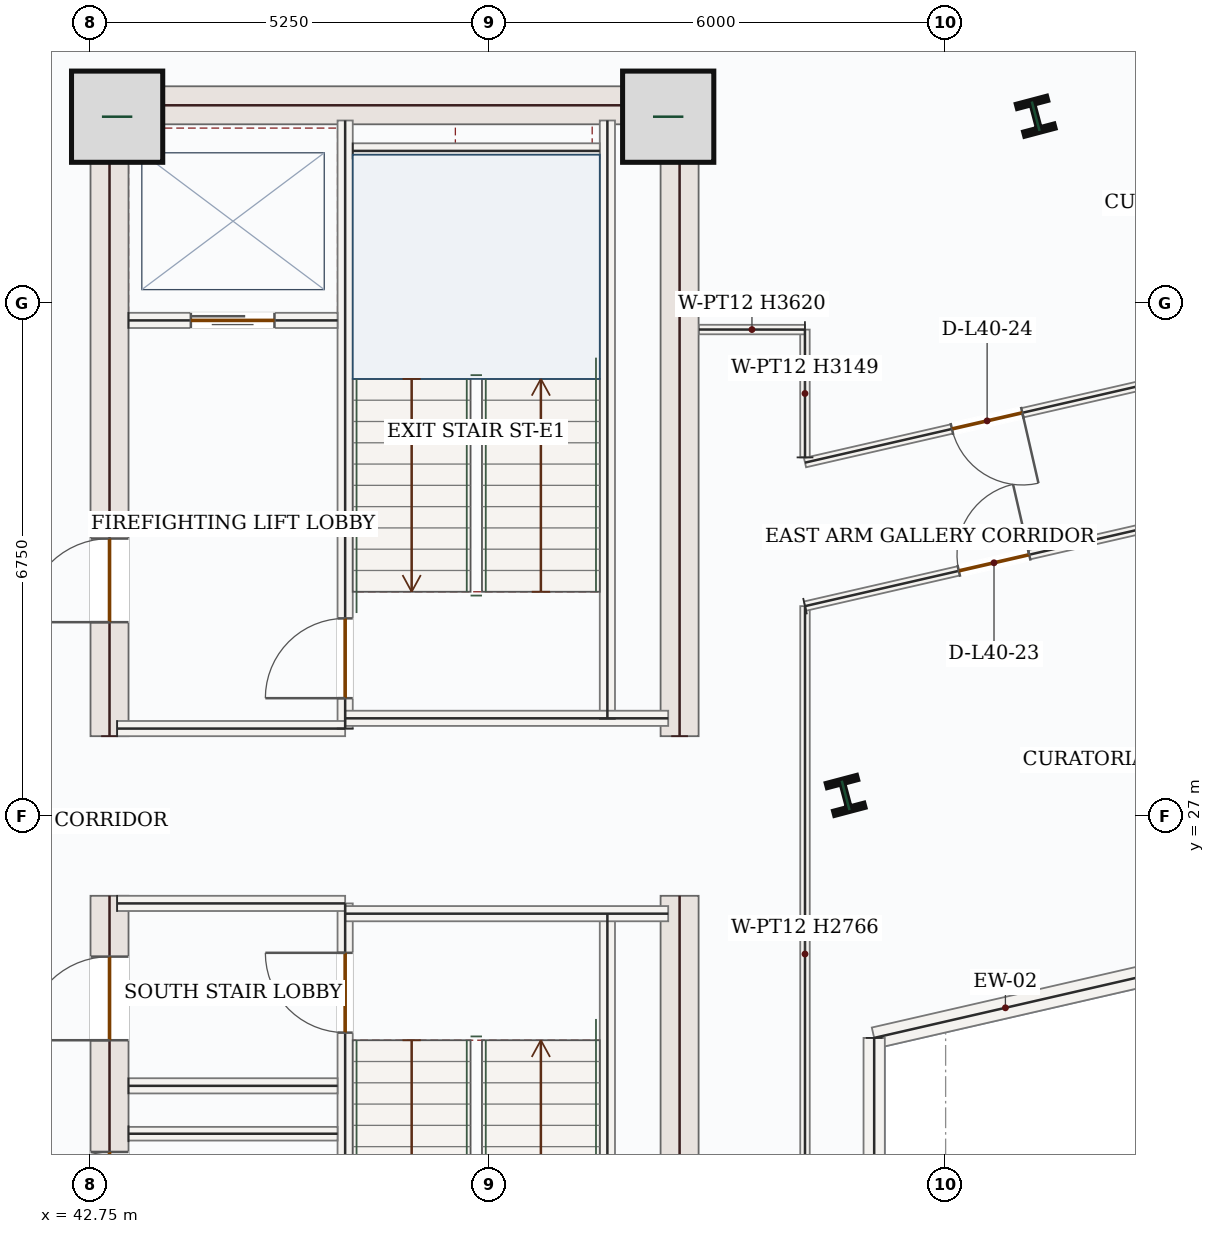
"""IFC4 building model, lengths in metres.
Left out: names, types, materials, properties, quantities, classifications, styles, units other than length and angle.
Written with IfcOpenShell. Run it as: python <this file> out.ifc"""

import sys

from ifc_helpers import new_model, si_unit, direction, frame, frame_2d, origin, origin_2d, place, context, subcontext, project, spatial, rectangle, i_section, extrude, source, transform, mapped, element, fill, save


model = new_model("IFC4")
c1 = context("Model", 3, precision=1e-05, world=origin(), true_north=direction((0.0, 1.0)))
c2 = subcontext(c1, "Body", "Model", "MODEL_VIEW")
j1 = project(units=[si_unit("LENGTHUNIT", "METRE"), si_unit("PLANEANGLEUNIT", "RADIAN")], contexts=[c1])
p1 = place(None, origin())
s1 = spatial("IfcSite", under=j1, at=p1, CompositionType="ELEMENT")
p2 = place(p1, origin())
s2 = spatial("IfcBuilding", under=s1, at=p2, CompositionType="ELEMENT")
p3 = place(p2, frame((0.0, 0.0, 174.6)))
s3 = spatial("IfcBuildingStorey", under=s2, at=p3, CompositionType="ELEMENT", Elevation=174.6)
p4 = place(p3, frame((43.0, 17.4, 0.0), z_axis=(0.0, 0.0, 1.0), x_axis=(0.0, 1.0, 0.0)))
e1 = element("IfcWall", 1, at=p4, inside=s3, PredefinedType="SHEAR", context=c2, shape_type="SweptSolid", body=[
    extrude(rectangle(XDim=8.55, YDim=0.5, at=frame_2d((4.275, 0.0))), origin(), (0.0, 0.0, 1.0), 3.62),
])
p5 = place(p4, frame((6.65, 0.0, 0.0)))
e2 = element("IfcOpeningElement", 2, at=p5, cuts=e1, PredefinedType="OPENING", context=c2, shape_type="SweptSolid", body=[
    extrude(rectangle(XDim=1.1, YDim=2.2, at=frame_2d((0.55, 1.1))), frame((0.0, 0.26, 0.0), z_axis=(0.0, -1.0, 0.0), x_axis=(1.0, 0.0, 0.0)), (0.0, 0.0, 1.0), 0.52),
])
p6 = place(p4, frame((1.75, 0.0, 0.0)))
e3 = element("IfcOpeningElement", 3, at=p6, cuts=e1, PredefinedType="OPENING", context=c2, shape_type="SweptSolid", body=[
    extrude(rectangle(XDim=1.3, YDim=2.2, at=frame_2d((0.65, 1.1))), frame((0.0, 0.26, 0.0), z_axis=(0.0, -1.0, 0.0), x_axis=(1.0, 0.0, 0.0)), (0.0, 0.0, 1.0), 0.52),
])
p7 = place(p4, frame((4.3, 0.0, 0.0)))
e4 = element("IfcOpeningElement", 4, at=p7, cuts=e1, PredefinedType="OPENING", context=c2, shape_type="SweptSolid", body=[
    extrude(rectangle(XDim=0.88, YDim=2.1, at=frame_2d((0.44, 1.05))), frame((0.0, 0.26, 0.0), z_axis=(0.0, -1.0, 0.0), x_axis=(1.0, 0.0, 0.0)), (0.0, 0.0, 1.0), 0.52),
])
p8 = place(p3, frame((43.0, 28.05, 0.0), z_axis=(0.0, 0.0, 1.0), x_axis=(0.0, 1.0, 0.0)))
e5 = element("IfcWall", 5, at=p8, inside=s3, PredefinedType="SHEAR", context=c2, shape_type="SweptSolid", body=[
    extrude(rectangle(XDim=8.55, YDim=0.5, at=frame_2d((4.275, 0.0))), origin(), (0.0, 0.0, 1.0), 3.62),
])
p9 = place(p8, frame((1.5, 0.0, 0.0)))
e6 = element("IfcOpeningElement", 6, at=p9, cuts=e5, PredefinedType="OPENING", context=c2, shape_type="SweptSolid", body=[
    extrude(rectangle(XDim=1.1, YDim=2.2, at=frame_2d((0.55, 1.1))), frame((0.0, 0.26, 0.0), z_axis=(0.0, -1.0, 0.0), x_axis=(1.0, 0.0, 0.0)), (0.0, 0.0, 1.0), 0.52),
])
m1 = source(origin(), c2, "Body", "SweptSolid", [
    extrude(rectangle(XDim=8.55, YDim=0.5, at=frame_2d((4.275, 0.0))), origin(), (0.0, 0.0, 1.0), 3.62),
])
for number, where, z_axis, x_axis in (
    (7, (50.5, 17.4, 0.0), (0.0, 0.0, 1.0), (0.0, 1.0, 0.0)),
    (8, (50.5, 28.05, 0.0), (0.0, 0.0, 1.0), (0.0, 1.0, 0.0)),
):
    element("IfcWall", number, at=place(p3, frame(where, z_axis=z_axis, x_axis=x_axis)), inside=s3, PredefinedType="SHEAR", context=c2, shape_type="MappedRepresentation", body=[
        mapped(m1, transform((0.0, 0.0, 0.0), x_axis=(1.0, 0.0, 0.0), y_axis=(0.0, 1.0, 0.0), z_axis=(0.0, 0.0, 1.0), scale=1.0)),
    ])
m2 = source(origin(), c2, "Body", "SweptSolid", [
    extrude(rectangle(XDim=7.0, YDim=0.5, at=frame_2d((3.5, 0.0))), origin(), (0.0, 0.0, 1.0), 3.62),
])
p10 = place(p3, frame((43.25, 36.35, 0.0), z_axis=(0.0, 0.0, 1.0), x_axis=(1.0, 0.0, 0.0)))
e9 = element("IfcWall", 9, at=p10, inside=s3, PredefinedType="SHEAR", context=c2, shape_type="MappedRepresentation", body=[
    mapped(m2, transform((0.0, 0.0, 0.0), x_axis=(1.0, 0.0, 0.0), y_axis=(0.0, 1.0, 0.0), z_axis=(0.0, 0.0, 1.0), scale=1.0)),
])
m3 = source(origin(), c2, "Body", "SweptSolid", [
    extrude(rectangle(XDim=1.2, YDim=1.2, at=origin_2d()), origin(), (0.0, 0.0, 1.0), 3.9),
])
for number, where, z_axis, x_axis in (
    (10, (43.1, 36.2, 0.0), (0.0, 0.0, 1.0), (1.0, 0.0, 0.0)),
    (11, (50.35, 36.2, 0.0), (0.0, 0.0, 1.0), (1.0, 0.0, 0.0)),
):
    element("IfcColumn", number, at=place(p3, frame(where, z_axis=z_axis, x_axis=x_axis)), inside=s3, PredefinedType="COLUMN", context=c2, shape_type="MappedRepresentation", body=[
        mapped(m3, transform((0.0, 0.0, 0.0), x_axis=(1.0, 0.0, 0.0), y_axis=(0.0, 1.0, 0.0), z_axis=(0.0, 0.0, 1.0), scale=1.0)),
    ])
m4 = source(origin(), c2, "Body", "SweptSolid", [
    extrude(i_section(OverallWidth=0.412, OverallDepth=0.435, WebThickness=0.036, FlangeThickness=0.057, FilletRadius=0.018, at=origin_2d()), origin(), (0.0, 0.0, 1.0), 3.9),
])
for number, where, z_axis, x_axis in (
    (12, (52.684, 27.271, 0.0), (0.0, 0.0, 1.0), (0.967, 0.255, 0.0)),
    (13, (55.185, 36.206, 0.0), (0.0, 0.0, 1.0), (0.967, 0.255, 0.0)),
):
    element("IfcColumn", number, at=place(p3, frame(where, z_axis=z_axis, x_axis=x_axis)), inside=s3, PredefinedType="COLUMN", context=c2, shape_type="MappedRepresentation", body=[
        mapped(m4, transform((0.0, 0.0, 0.0), x_axis=(1.0, 0.0, 0.0), y_axis=(0.0, 1.0, 0.0), z_axis=(0.0, 0.0, 1.0), scale=1.0)),
    ])
p11 = place(p3, frame((62.012, 26.134, 0.0), z_axis=(0.0, 0.0, 1.0), x_axis=(-0.974680686557, -0.223601340005, 0.0)))
e14 = element("IfcWall", 14, at=p11, inside=s3, PredefinedType="SOLIDWALL", context=c2, shape_type="SweptSolid", body=[
    extrude(rectangle(XDim=9.185, YDim=0.28, at=frame_2d((4.592, 0.0))), origin(), (0.0, 0.0, 1.0), 3.62),
])
p12 = place(p11, frame((3.692, 0.0, 0.85)))
e15 = element("IfcOpeningElement", 15, at=p12, cuts=e14, PredefinedType="OPENING", context=c2, shape_type="SweptSolid", body=[
    extrude(rectangle(XDim=1.8, YDim=1.75, at=frame_2d((0.9, 0.875))), frame((0.0, 0.15, 0.0), z_axis=(0.0, -1.0, 0.0), x_axis=(1.0, 0.0, 0.0)), (0.0, 0.0, 1.0), 0.3),
])
p13 = place(p3, frame((53.06, 24.081, 0.0), z_axis=(0.0, 0.0, 1.0), x_axis=(0.0, -1.0, 0.0)))
e16 = element("IfcWall", 16, at=p13, inside=s3, PredefinedType="SOLIDWALL", context=c2, shape_type="SweptSolid", body=[
    extrude(rectangle(XDim=5.623, YDim=0.28, at=frame_2d((2.811, 0.0))), origin(), (0.0, 0.0, 1.0), 3.62),
])
p14 = place(p13, frame((1.911, 0.0, 0.85)))
e17 = element("IfcOpeningElement", 17, at=p14, cuts=e16, PredefinedType="OPENING", context=c2, shape_type="SweptSolid", body=[
    extrude(rectangle(XDim=1.8, YDim=1.75, at=frame_2d((0.9, 0.875))), frame((0.0, 0.15, 0.0), z_axis=(0.0, -1.0, 0.0), x_axis=(1.0, 0.0, 0.0)), (0.0, 0.0, 1.0), 0.3),
])
m5 = source(origin(), c2, "Body", "SweptSolid", [
    extrude(rectangle(XDim=7.87, YDim=0.2, at=frame_2d((3.935, 0.0))), origin(), (0.0, 0.0, 1.0), 3.62),
])
for number, where, z_axis, x_axis in (
    (18, (49.55, 17.85, 0.0), (0.0, 0.0, 1.0), (0.0, 1.0, 0.0)),
    (19, (49.55, 28.28, 0.0), (0.0, 0.0, 1.0), (0.0, 1.0, 0.0)),
):
    element("IfcWall", number, at=place(p3, frame(where, z_axis=z_axis, x_axis=x_axis)), inside=s3, PredefinedType="SOLIDWALL", context=c2, shape_type="MappedRepresentation", body=[
        mapped(m5, transform((0.0, 0.0, 0.0), x_axis=(1.0, 0.0, 0.0), y_axis=(0.0, 1.0, 0.0), z_axis=(0.0, 0.0, 1.0), scale=1.0)),
    ])
p15 = place(p3, frame((46.1, 17.85, 0.0), z_axis=(0.0, 0.0, 1.0), x_axis=(0.0, 1.0, 0.0)))
e20 = element("IfcWall", 20, at=p15, inside=s3, PredefinedType="SOLIDWALL", context=c2, shape_type="SweptSolid", body=[
    extrude(rectangle(XDim=8.0, YDim=0.2, at=frame_2d((4.0, 0.0))), origin(), (0.0, 0.0, 1.0), 3.62),
])
p16 = place(p15, frame((6.3, 0.0, 0.0)))
e21 = element("IfcOpeningElement", 21, at=p16, cuts=e20, PredefinedType="OPENING", context=c2, shape_type="SweptSolid", body=[
    extrude(rectangle(XDim=1.05, YDim=2.15, at=frame_2d((0.525, 1.075))), frame((0.0, 0.11, 0.0), z_axis=(0.0, -1.0, 0.0), x_axis=(1.0, 0.0, 0.0)), (0.0, 0.0, 1.0), 0.22),
])
p17 = place(p3, frame((46.1, 28.15, 0.0), z_axis=(0.0, 0.0, 1.0), x_axis=(0.0, 1.0, 0.0)))
e22 = element("IfcWall", 22, at=p17, inside=s3, PredefinedType="SOLIDWALL", context=c2, shape_type="SweptSolid", body=[
    extrude(rectangle(XDim=8.0, YDim=0.2, at=frame_2d((4.0, 0.0))), origin(), (0.0, 0.0, 1.0), 3.62),
])
p18 = place(p17, frame((0.4, 0.0, 0.0)))
e23 = element("IfcOpeningElement", 23, at=p18, cuts=e22, PredefinedType="OPENING", context=c2, shape_type="SweptSolid", body=[
    extrude(rectangle(XDim=1.05, YDim=2.15, at=frame_2d((0.525, 1.075))), frame((0.0, 0.11, 0.0), z_axis=(0.0, -1.0, 0.0), x_axis=(1.0, 0.0, 0.0)), (0.0, 0.0, 1.0), 0.22),
])
m6 = source(origin(), c2, "Body", "SweptSolid", [
    extrude(rectangle(XDim=3.0, YDim=0.2, at=frame_2d((1.5, 0.0))), origin(), (0.0, 0.0, 1.0), 3.62),
])
p19 = place(p3, frame((43.1, 25.85, 0.0), z_axis=(0.0, 0.0, 1.0), x_axis=(1.0, 0.0, 0.0)))
e24 = element("IfcWall", 24, at=p19, inside=s3, PredefinedType="SOLIDWALL", context=c2, shape_type="MappedRepresentation", body=[
    mapped(m6, transform((0.0, 0.0, 0.0), x_axis=(1.0, 0.0, 0.0), y_axis=(0.0, 1.0, 0.0), z_axis=(0.0, 0.0, 1.0), scale=1.0)),
])
m7 = source(origin(), c2, "Body", "SweptSolid", [
    extrude(rectangle(XDim=4.25, YDim=0.2, at=frame_2d((2.125, 0.0))), origin(), (0.0, 0.0, 1.0), 3.62),
])
p20 = place(p3, frame((46.1, 25.715, 0.0), z_axis=(0.0, 0.0, 1.0), x_axis=(1.0, 0.0, 0.0)))
e25 = element("IfcWall", 25, at=p20, inside=s3, PredefinedType="SOLIDWALL", context=c2, shape_type="MappedRepresentation", body=[
    mapped(m7, transform((0.0, 0.0, 0.0), x_axis=(1.0, 0.0, 0.0), y_axis=(0.0, 1.0, 0.0), z_axis=(0.0, 0.0, 1.0), scale=1.0)),
])
p21 = place(p3, frame((43.1, 28.15, 0.0), z_axis=(0.0, 0.0, 1.0), x_axis=(1.0, 0.0, 0.0)))
e26 = element("IfcWall", 26, at=p21, inside=s3, PredefinedType="SOLIDWALL", context=c2, shape_type="MappedRepresentation", body=[
    mapped(m6, transform((0.0, 0.0, 0.0), x_axis=(1.0, 0.0, 0.0), y_axis=(0.0, 1.0, 0.0), z_axis=(0.0, 0.0, 1.0), scale=1.0)),
])
p22 = place(p3, frame((46.1, 28.285, 0.0), z_axis=(0.0, 0.0, 1.0), x_axis=(1.0, 0.0, 0.0)))
e27 = element("IfcWall", 27, at=p22, inside=s3, PredefinedType="SOLIDWALL", context=c2, shape_type="MappedRepresentation", body=[
    mapped(m7, transform((0.0, 0.0, 0.0), x_axis=(1.0, 0.0, 0.0), y_axis=(0.0, 1.0, 0.0), z_axis=(0.0, 0.0, 1.0), scale=1.0)),
])
m8 = source(origin(), c2, "Body", "SweptSolid", [
    extrude(rectangle(XDim=3.25, YDim=0.2, at=frame_2d((1.625, 0.0))), origin(), (0.0, 0.0, 1.0), 3.62),
])
p23 = place(p3, frame((46.2, 35.75, 0.0), z_axis=(0.0, 0.0, 1.0), x_axis=(1.0, 0.0, 0.0)))
e28 = element("IfcWall", 28, at=p23, inside=s3, PredefinedType="SOLIDWALL", context=c2, shape_type="MappedRepresentation", body=[
    mapped(m8, transform((0.0, 0.0, 0.0), x_axis=(1.0, 0.0, 0.0), y_axis=(0.0, 1.0, 0.0), z_axis=(0.0, 0.0, 1.0), scale=1.0)),
])
p24 = place(p3, frame((43.25, 33.52, 0.0), z_axis=(0.0, 0.0, 1.0), x_axis=(1.0, 0.0, 0.0)))
e29 = element("IfcWall", 29, at=p24, inside=s3, PredefinedType="SOLIDWALL", context=c2, shape_type="SweptSolid", body=[
    extrude(rectangle(XDim=2.75, YDim=0.2, at=frame_2d((1.375, 0.0))), origin(), (0.0, 0.0, 1.0), 3.62),
])
p25 = place(p24, frame((0.82, 0.0, 0.0)))
e30 = element("IfcOpeningElement", 30, at=p25, cuts=e29, PredefinedType="OPENING", context=c2, shape_type="SweptSolid", body=[
    extrude(rectangle(XDim=1.1, YDim=2.15, at=frame_2d((0.55, 1.075))), frame((0.0, 0.11, 0.0), z_axis=(0.0, -1.0, 0.0), x_axis=(1.0, 0.0, 0.0)), (0.0, 0.0, 1.0), 0.22),
])
m9 = source(origin(), c2, "Body", "SweptSolid", [
    extrude(rectangle(XDim=2.75, YDim=0.2, at=frame_2d((1.375, 0.0))), origin(), (0.0, 0.0, 1.0), 3.62),
])
p26 = place(p3, frame((43.25, 23.45, 0.0), z_axis=(0.0, 0.0, 1.0), x_axis=(1.0, 0.0, 0.0)))
e31 = element("IfcWall", 31, at=p26, inside=s3, PredefinedType="SOLIDWALL", context=c2, shape_type="MappedRepresentation", body=[
    mapped(m9, transform((0.0, 0.0, 0.0), x_axis=(1.0, 0.0, 0.0), y_axis=(0.0, 1.0, 0.0), z_axis=(0.0, 0.0, 1.0), scale=1.0)),
])
m10 = source(origin(), c2, "Body", "SweptSolid", [
    extrude(rectangle(XDim=2.75, YDim=0.18, at=frame_2d((1.375, 0.0))), origin(), (0.0, 0.0, 1.0), 3.62),
])
p27 = place(p3, frame((43.25, 22.82, 0.0), z_axis=(0.0, 0.0, 1.0), x_axis=(1.0, 0.0, 0.0)))
e32 = element("IfcWall", 32, at=p27, inside=s3, PredefinedType="PARTITIONING", context=c2, shape_type="MappedRepresentation", body=[
    mapped(m10, transform((0.0, 0.0, 0.0), x_axis=(1.0, 0.0, 0.0), y_axis=(0.0, 1.0, 0.0), z_axis=(0.0, 0.0, 1.0), scale=1.0)),
])
m11 = source(origin(), c2, "Body", "SweptSolid", [
    extrude(rectangle(XDim=9.153, YDim=0.125, at=frame_2d((4.577, 0.0))), origin(), (0.0, 0.0, 1.0), 2.766),
])
p28 = place(p3, frame((52.15, 20.608, 0.0), z_axis=(0.0, 0.0, 1.0), x_axis=(2.6672357e-05, 0.999999999644, 0.0)))
e33 = element("IfcWall", 33, at=p28, inside=s3, PredefinedType="PARTITIONING", context=c2, shape_type="MappedRepresentation", body=[
    mapped(m11, transform((0.0, 0.0, 0.0), x_axis=(1.0, 0.0, 0.0), y_axis=(0.0, 1.0, 0.0), z_axis=(0.0, 0.0, 1.0), scale=1.0)),
])
p29 = place(p3, frame((52.15, 29.761, 0.0), z_axis=(0.0, 0.0, 1.0), x_axis=(0.974685490502, 0.223580398525, 0.0)))
e34 = element("IfcWall", 34, at=p29, inside=s3, PredefinedType="PARTITIONING", context=c2, shape_type="SweptSolid", body=[
    extrude(rectangle(XDim=10.387, YDim=0.125, at=frame_2d((5.193, 0.0))), origin(), (0.0, 0.0, 1.0), 3.62),
])
p30 = place(p29, frame((2.076, 0.0, 0.0)))
e35 = element("IfcOpeningElement", 35, at=p30, cuts=e34, PredefinedType="OPENING", context=c2, shape_type="SweptSolid", body=[
    extrude(rectangle(XDim=0.95, YDim=2.15, at=frame_2d((0.475, 1.075))), frame((0.0, 0.073, 0.0), z_axis=(0.0, -1.0, 0.0), x_axis=(1.0, 0.0, 0.0)), (0.0, 0.0, 1.0), 0.145),
])
p31 = place(p3, frame((61.862, 33.877, 0.0), z_axis=(0.0, 0.0, 1.0), x_axis=(-0.974682727551, -0.223592443106, 0.0)))
e36 = element("IfcWall", 36, at=p31, inside=s3, PredefinedType="PARTITIONING", context=c2, shape_type="SweptSolid", body=[
    extrude(rectangle(XDim=9.965, YDim=0.125, at=frame_2d((4.982, 0.0))), origin(), (0.0, 0.0, 1.0), 3.62),
])
p32 = place(p31, frame((7.031, 0.0, 0.0)))
e37 = element("IfcOpeningElement", 37, at=p32, cuts=e36, PredefinedType="OPENING", context=c2, shape_type="SweptSolid", body=[
    extrude(rectangle(XDim=0.95, YDim=2.15, at=frame_2d((0.475, 1.075))), frame((0.0, 0.073, 0.0), z_axis=(0.0, -1.0, 0.0), x_axis=(1.0, 0.0, 0.0)), (0.0, 0.0, 1.0), 0.145),
])
m12 = source(origin(), c2, "Body", "SweptSolid", [
    extrude(rectangle(XDim=1.681, YDim=0.125, at=frame_2d((0.84, 0.0))), origin(), (0.0, 0.0, 1.0), 3.149),
])
p33 = place(p3, frame((52.15, 31.718, 0.0), z_axis=(0.0, 0.0, 1.0), x_axis=(-0.000580973032, 0.999999831235, 0.0)))
e38 = element("IfcWall", 38, at=p33, inside=s3, PredefinedType="PARTITIONING", context=c2, shape_type="MappedRepresentation", body=[
    mapped(m12, transform((0.0, 0.0, 0.0), x_axis=(1.0, 0.0, 0.0), y_axis=(0.0, 1.0, 0.0), z_axis=(0.0, 0.0, 1.0), scale=1.0)),
])
m13 = source(origin(), c2, "Body", "SweptSolid", [
    extrude(rectangle(XDim=1.394, YDim=0.125, at=frame_2d((0.697, 0.0))), origin(), (0.0, 0.0, 1.0), 3.62),
])
p34 = place(p3, frame((52.149, 33.399, 0.0), z_axis=(0.0, 0.0, 1.0), x_axis=(-0.999999754632, 0.000700525222, 0.0)))
e39 = element("IfcWall", 39, at=p34, inside=s3, PredefinedType="PARTITIONING", context=c2, shape_type="MappedRepresentation", body=[
    mapped(m13, transform((0.0, 0.0, 0.0), x_axis=(1.0, 0.0, 0.0), y_axis=(0.0, 1.0, 0.0), z_axis=(0.0, 0.0, 1.0), scale=1.0)),
])
m14 = source(origin(), c2, "Body", "SweptSolid", [
    extrude(rectangle(XDim=1.05, YDim=2.15, at=frame_2d((0.525, 1.075))), frame((0.0, 0.025, 0.0), z_axis=(0.0, -1.0, 0.0), x_axis=(1.0, 0.0, 0.0)), (0.0, 0.0, 1.0), 0.05),
])
p35 = place(p18, origin())
e40 = element("IfcDoor", 40, at=p35, inside=s3, OperationType="SINGLE_SWING_LEFT", PredefinedType="DOOR", context=c2, shape_type="MappedRepresentation", body=[
    mapped(m14, transform((0.0, 0.0, 0.0), x_axis=(1.0, 0.0, 0.0), y_axis=(0.0, 1.0, 0.0), z_axis=(0.0, 0.0, 1.0), scale=1.0)),
])
fill(e23, e40)
p36 = place(p16, origin())
e41 = element("IfcDoor", 41, at=p36, inside=s3, OperationType="SINGLE_SWING_RIGHT", PredefinedType="DOOR", context=c2, shape_type="MappedRepresentation", body=[
    mapped(m14, transform((0.0, 0.0, 0.0), x_axis=(1.0, 0.0, 0.0), y_axis=(0.0, 1.0, 0.0), z_axis=(0.0, 0.0, 1.0), scale=1.0)),
])
fill(e21, e41)
m15 = source(origin(), c2, "Body", "SweptSolid", [
    extrude(rectangle(XDim=1.1, YDim=2.15, at=frame_2d((0.55, 1.075))), frame((0.0, 0.025, 0.0), z_axis=(0.0, -1.0, 0.0), x_axis=(1.0, 0.0, 0.0)), (0.0, 0.0, 1.0), 0.05),
])
p37 = place(p25, origin())
e42 = element("IfcDoor", 42, at=p37, inside=s3, OperationType="DOUBLE_DOOR_SLIDING", PredefinedType="DOOR", context=c2, shape_type="MappedRepresentation", body=[
    mapped(m15, transform((0.0, 0.0, 0.0), x_axis=(1.0, 0.0, 0.0), y_axis=(0.0, 1.0, 0.0), z_axis=(0.0, 0.0, 1.0), scale=1.0)),
])
fill(e30, e42)
m16 = source(origin(), c2, "Body", "SweptSolid", [
    extrude(rectangle(XDim=1.1, YDim=2.2, at=frame_2d((0.55, 1.1))), frame((0.0, 0.025, 0.0), z_axis=(0.0, -1.0, 0.0), x_axis=(1.0, 0.0, 0.0)), (0.0, 0.0, 1.0), 0.05),
])
p38 = place(p9, origin())
e43 = element("IfcDoor", 43, at=p38, inside=s3, OperationType="SINGLE_SWING_LEFT", PredefinedType="DOOR", context=c2, shape_type="MappedRepresentation", body=[
    mapped(m16, transform((0.0, 0.0, 0.0), x_axis=(1.0, 0.0, 0.0), y_axis=(0.0, 1.0, 0.0), z_axis=(0.0, 0.0, 1.0), scale=1.0)),
])
fill(e6, e43)
p39 = place(p5, origin())
e44 = element("IfcDoor", 44, at=p39, inside=s3, OperationType="SINGLE_SWING_LEFT", PredefinedType="DOOR", context=c2, shape_type="MappedRepresentation", body=[
    mapped(m16, transform((0.0, 0.0, 0.0), x_axis=(1.0, 0.0, 0.0), y_axis=(0.0, 1.0, 0.0), z_axis=(0.0, 0.0, 1.0), scale=1.0)),
])
fill(e2, e44)
m17 = source(origin(), c2, "Body", "SweptSolid", [
    extrude(rectangle(XDim=0.88, YDim=2.1, at=frame_2d((0.44, 1.05))), frame((0.0, 0.025, 0.0), z_axis=(0.0, -1.0, 0.0), x_axis=(1.0, 0.0, 0.0)), (0.0, 0.0, 1.0), 0.05),
])
p40 = place(p7, origin())
e45 = element("IfcDoor", 45, at=p40, inside=s3, OperationType="SINGLE_SWING_LEFT", PredefinedType="DOOR", context=c2, shape_type="MappedRepresentation", body=[
    mapped(m17, transform((0.0, 0.0, 0.0), x_axis=(1.0, 0.0, 0.0), y_axis=(0.0, 1.0, 0.0), z_axis=(0.0, 0.0, 1.0), scale=1.0)),
])
fill(e4, e45)
m18 = source(origin(), c2, "Body", "SweptSolid", [
    extrude(rectangle(XDim=0.95, YDim=2.15, at=frame_2d((0.475, 1.075))), frame((0.0, 0.025, 0.0), z_axis=(0.0, -1.0, 0.0), x_axis=(1.0, 0.0, 0.0)), (0.0, 0.0, 1.0), 0.05),
])
p41 = place(p30, origin())
e46 = element("IfcDoor", 46, at=p41, inside=s3, OperationType="SINGLE_SWING_RIGHT", PredefinedType="DOOR", context=c2, shape_type="MappedRepresentation", body=[
    mapped(m18, transform((0.0, 0.0, 0.0), x_axis=(1.0, 0.0, 0.0), y_axis=(0.0, 1.0, 0.0), z_axis=(0.0, 0.0, 1.0), scale=1.0)),
])
fill(e35, e46)
p42 = place(p32, origin())
e47 = element("IfcDoor", 47, at=p42, inside=s3, OperationType="SINGLE_SWING_LEFT", PredefinedType="DOOR", context=c2, shape_type="MappedRepresentation", body=[
    mapped(m18, transform((0.0, 0.0, 0.0), x_axis=(1.0, 0.0, 0.0), y_axis=(0.0, 1.0, 0.0), z_axis=(0.0, 0.0, 1.0), scale=1.0)),
])
fill(e37, e47)
save(model, sys.argv[1])
